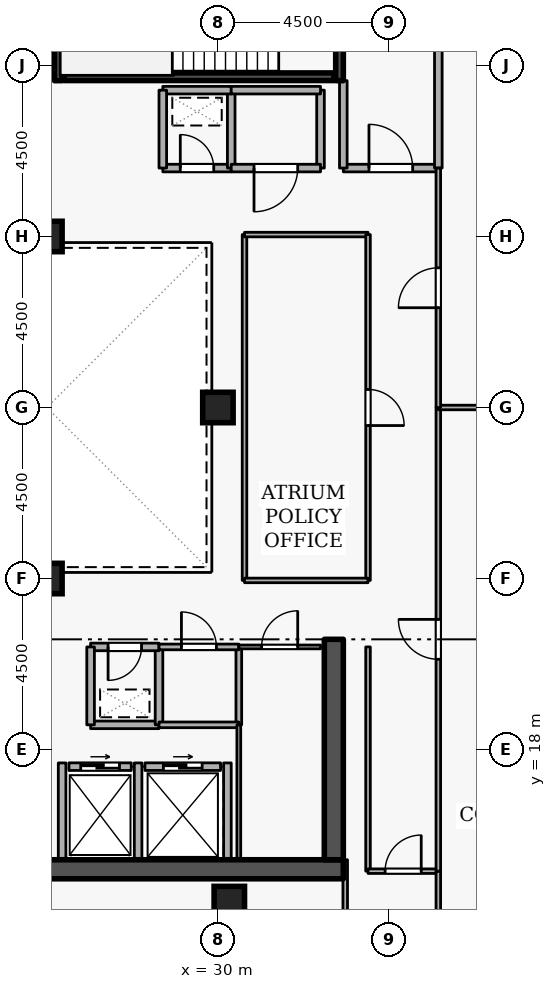
"""IFC4 building model, lengths in metres.
Left out: names, types, materials, properties, quantities, classifications, styles, units other than length and angle.
Written with IfcOpenShell. Run it as: python <this file> out.ifc"""

import sys

from ifc_helpers import new_model, si_unit, direction, frame, frame_2d, origin, origin_2d, place, context, subcontext, project, spatial, rectangle, extrude, element, fill, save


model = new_model("IFC4")
c1 = context("Model", 3, precision=1e-05, world=origin(), true_north=direction((0.0, 1.0)))
c2 = subcontext(c1, "Body", "Model", "MODEL_VIEW")
j1 = project(units=[si_unit("LENGTHUNIT", "METRE"), si_unit("PLANEANGLEUNIT", "RADIAN")], contexts=[c1])
p1 = place(None, origin())
s1 = spatial("IfcSite", under=j1, at=p1, CompositionType="ELEMENT")
p2 = place(p1, origin())
s2 = spatial("IfcBuilding", under=s1, at=p2, CompositionType="ELEMENT")
p3 = place(p2, frame((0.0, 0.0, 254.7)))
s3 = spatial("IfcBuildingStorey", under=s2, at=p3, CompositionType="ELEMENT", Elevation=254.7)
p4 = place(p3, frame((17.7, 14.85, 0.0), z_axis=(0.0, 0.0, 1.0), x_axis=(1.0, 0.0, 0.0)))
e1 = element("IfcWall", 1, at=p4, inside=s3, PredefinedType="SHEAR", context=c2, shape_type="SweptSolid", body=[
    extrude(rectangle(XDim=15.6, YDim=0.5, at=frame_2d((7.8, 0.0))), origin(), (0.0, 0.0, 1.0), 3.6),
])
p5 = place(p3, frame((33.05, 15.1, 0.0), z_axis=(0.0, 0.0, 1.0), x_axis=(0.0, 1.0, 0.0)))
e2 = element("IfcWall", 2, at=p5, inside=s3, PredefinedType="SHEAR", context=c2, shape_type="SweptSolid", body=[
    extrude(rectangle(XDim=5.8, YDim=0.5, at=frame_2d((2.9, 0.0))), origin(), (0.0, 0.0, 1.0), 3.6),
])
for number, where, z_axis, x_axis in (
    (3, (30.3, 14.0, 0.0), (0.0, 0.0, 1.0), (1.0, 0.0, 0.0)),
    (4, (25.5, 22.5, 0.0), (0.0, 0.0, 1.0), (1.0, 0.0, 0.0)),
    (5, (25.5, 31.5, 0.0), (0.0, 0.0, 1.0), (1.0, 0.0, 0.0)),
    (6, (30.0, 27.0, 0.0), (0.0, 0.0, 1.0), (1.0, 0.0, 0.0)),
):
    element("IfcColumn", number, at=place(p3, frame(where, z_axis=z_axis, x_axis=x_axis)), inside=s3, PredefinedType="COLUMN", context=c2, shape_type="SweptSolid", body=[
        extrude(rectangle(XDim=0.8, YDim=0.8, at=origin_2d()), origin(), (0.0, 0.0, 1.0), 3.6),
    ])
p6 = place(p3, frame((26.08, 17.55, 0.0), z_axis=(0.0, 0.0, 1.0), x_axis=(1.0, 0.0, 0.0)))
e7 = element("IfcWall", 7, at=p6, inside=s3, PredefinedType="STANDARD", context=c2, shape_type="SweptSolid", body=[
    extrude(rectangle(XDim=1.64, YDim=0.2, at=frame_2d((0.82, 0.0))), origin(), (0.0, 0.0, 1.0), 3.32),
])
p7 = place(p6, frame((0.31, 0.0, 0.0)))
e8 = element("IfcOpeningElement", 8, at=p7, cuts=e7, PredefinedType="OPENING", context=c2, shape_type="SweptSolid", body=[
    extrude(rectangle(XDim=1.02, YDim=2.06, at=frame_2d((0.51, 1.03))), frame((0.0, 0.11, 0.0), z_axis=(0.0, -1.0, 0.0), x_axis=(1.0, 0.0, 0.0)), (0.0, 0.0, 1.0), 0.22),
])
p8 = place(p3, frame((28.08, 17.55, 0.0), z_axis=(0.0, 0.0, 1.0), x_axis=(1.0, 0.0, 0.0)))
e9 = element("IfcWall", 9, at=p8, inside=s3, PredefinedType="STANDARD", context=c2, shape_type="SweptSolid", body=[
    extrude(rectangle(XDim=1.99, YDim=0.2, at=frame_2d((0.995, 0.0))), origin(), (0.0, 0.0, 1.0), 3.32),
])
p9 = place(p8, frame((0.485, 0.0, 0.0)))
e10 = element("IfcOpeningElement", 10, at=p9, cuts=e9, PredefinedType="OPENING", context=c2, shape_type="SweptSolid", body=[
    extrude(rectangle(XDim=1.02, YDim=2.06, at=frame_2d((0.51, 1.03))), frame((0.0, 0.11, 0.0), z_axis=(0.0, -1.0, 0.0), x_axis=(1.0, 0.0, 0.0)), (0.0, 0.0, 1.0), 0.22),
])
for number, where, z_axis, x_axis in (
    (11, (27.9, 15.112, 0.0), (0.0, 0.0, 1.0), (0.0, 1.0, 0.0)),
    (12, (25.9, 15.112, 0.0), (0.0, 0.0, 1.0), (0.0, 1.0, 0.0)),
    (13, (30.25, 15.112, 0.0), (0.0, 0.0, 1.0), (0.0, 1.0, 0.0)),
):
    element("IfcWall", number, at=place(p3, frame(where, z_axis=z_axis, x_axis=x_axis)), inside=s3, PredefinedType="STANDARD", context=c2, shape_type="SweptSolid", body=[
        extrude(rectangle(XDim=2.536, YDim=0.2, at=frame_2d((1.268, 0.0))), origin(), (0.0, 0.0, 1.0), 3.32),
    ])
p10 = place(p3, frame((33.2, 38.95, 0.0), z_axis=(0.0, 0.0, 1.0), x_axis=(0.0, -1.0, 0.0)))
e14 = element("IfcWall", 14, at=p10, inside=s3, PredefinedType="SHEAR", context=c2, shape_type="SweptSolid", body=[
    extrude(rectangle(XDim=3.35, YDim=0.2, at=frame_2d((1.675, 0.0))), origin(), (0.0, 0.0, 1.0), 3.6),
])
p11 = place(p10, frame((1.125, 0.0, 0.0)))
e15 = element("IfcOpeningElement", 15, at=p11, cuts=e14, PredefinedType="OPENING", context=c2, shape_type="SweptSolid", body=[
    extrude(rectangle(XDim=1.1, YDim=2.1, at=frame_2d((0.55, 1.05))), frame((0.0, 0.11, 0.0), z_axis=(0.0, -1.0, 0.0), x_axis=(1.0, 0.0, 0.0)), (0.0, 0.0, 1.0), 0.22),
])
p12 = place(p3, frame((25.8, 35.6, 0.0), z_axis=(0.0, 0.0, 1.0), x_axis=(0.0, 1.0, 0.0)))
e16 = element("IfcWall", 16, at=p12, inside=s3, PredefinedType="SHEAR", context=c2, shape_type="SweptSolid", body=[
    extrude(rectangle(XDim=3.35, YDim=0.2, at=frame_2d((1.675, 0.0))), origin(), (0.0, 0.0, 1.0), 3.6),
])
p13 = place(p3, frame((25.95, 35.703, 0.0), z_axis=(0.0, 0.0, 1.0), x_axis=(1.0, 0.0, 0.0)))
e17 = element("IfcWall", 17, at=p13, inside=s3, PredefinedType="SHEAR", context=c2, shape_type="SweptSolid", body=[
    extrude(rectangle(XDim=7.1, YDim=0.2, at=frame_2d((3.55, 0.0))), origin(), (0.0, 0.0, 1.0), 3.6),
])
p14 = place(p3, frame((33.3, 33.3, 0.0), z_axis=(0.0, 0.0, 1.0), x_axis=(1.0, 0.0, 0.0)))
e18 = element("IfcWall", 18, at=p14, inside=s3, PredefinedType="STANDARD", context=c2, shape_type="SweptSolid", body=[
    extrude(rectangle(XDim=2.5, YDim=0.2, at=frame_2d((1.25, 0.0))), origin(), (0.0, 0.0, 1.0), 3.32),
])
p15 = place(p14, frame((0.675, 0.0, 0.0)))
e19 = element("IfcOpeningElement", 19, at=p15, cuts=e18, PredefinedType="OPENING", context=c2, shape_type="SweptSolid", body=[
    extrude(rectangle(XDim=1.15, YDim=2.1, at=frame_2d((0.575, 1.05))), frame((0.0, 0.11, 0.0), z_axis=(0.0, -1.0, 0.0), x_axis=(1.0, 0.0, 0.0)), (0.0, 0.0, 1.0), 0.22),
])
p16 = place(p3, frame((35.8, 33.3, 0.0), z_axis=(0.0, 0.0, 1.0), x_axis=(0.0, 1.0, 0.0)))
e20 = element("IfcWall", 20, at=p16, inside=s3, PredefinedType="STANDARD", context=c2, shape_type="SweptSolid", body=[
    extrude(rectangle(XDim=5.7, YDim=0.2, at=frame_2d((2.85, 0.0))), origin(), (0.0, 0.0, 1.0), 3.32),
])
p17 = place(p3, frame((33.3, 35.6, 0.0), z_axis=(0.0, 0.0, 1.0), x_axis=(0.0, -1.0, 0.0)))
e21 = element("IfcWall", 21, at=p17, inside=s3, PredefinedType="STANDARD", context=c2, shape_type="SweptSolid", body=[
    extrude(rectangle(XDim=2.3, YDim=0.2, at=frame_2d((1.15, 0.0))), origin(), (0.0, 0.0, 1.0), 2.525),
])
p18 = place(p3, frame((26.65, 18.65, 0.0), z_axis=(0.0, 0.0, 1.0), x_axis=(1.0, 0.0, 0.0)))
e22 = element("IfcWall", 22, at=p18, inside=s3, PredefinedType="STANDARD", context=c2, shape_type="SweptSolid", body=[
    extrude(rectangle(XDim=1.8, YDim=0.2, at=frame_2d((0.9, 0.0))), origin(), (0.0, 0.0, 1.0), 3.32),
])
p19 = place(p3, frame((28.45, 18.65, 0.0), z_axis=(0.0, 0.0, 1.0), x_axis=(0.0, 1.0, 0.0)))
e23 = element("IfcWall", 23, at=p19, inside=s3, PredefinedType="STANDARD", context=c2, shape_type="SweptSolid", body=[
    extrude(rectangle(XDim=2.05, YDim=0.2, at=frame_2d((1.025, 0.0))), origin(), (0.0, 0.0, 1.0), 3.32),
])
p20 = place(p3, frame((28.45, 20.7, 0.0), z_axis=(0.0, 0.0, 1.0), x_axis=(-1.0, 0.0, 0.0)))
e24 = element("IfcWall", 24, at=p20, inside=s3, PredefinedType="STANDARD", context=c2, shape_type="SweptSolid", body=[
    extrude(rectangle(XDim=1.8, YDim=0.2, at=frame_2d((0.9, 0.0))), origin(), (0.0, 0.0, 1.0), 3.32),
])
p21 = place(p20, frame((0.46, 0.0, 0.0)))
e25 = element("IfcOpeningElement", 25, at=p21, cuts=e24, PredefinedType="OPENING", context=c2, shape_type="SweptSolid", body=[
    extrude(rectangle(XDim=0.88, YDim=2.04, at=frame_2d((0.44, 1.02))), frame((0.0, 0.11, 0.0), z_axis=(0.0, -1.0, 0.0), x_axis=(1.0, 0.0, 0.0)), (0.0, 0.0, 1.0), 0.22),
])
p22 = place(p3, frame((26.65, 20.7, 0.0), z_axis=(0.0, 0.0, 1.0), x_axis=(0.0, -1.0, 0.0)))
e26 = element("IfcWall", 26, at=p22, inside=s3, PredefinedType="STANDARD", context=c2, shape_type="SweptSolid", body=[
    extrude(rectangle(XDim=2.05, YDim=0.2, at=frame_2d((1.025, 0.0))), origin(), (0.0, 0.0, 1.0), 3.32),
])
p23 = place(p3, frame((28.55, 33.3, 0.0), z_axis=(0.0, 0.0, 1.0), x_axis=(1.0, 0.0, 0.0)))
e27 = element("IfcWall", 27, at=p23, inside=s3, PredefinedType="STANDARD", context=c2, shape_type="SweptSolid", body=[
    extrude(rectangle(XDim=1.8, YDim=0.2, at=frame_2d((0.9, 0.0))), origin(), (0.0, 0.0, 1.0), 3.32),
])
p24 = place(p23, frame((0.46, 0.0, 0.0)))
e28 = element("IfcOpeningElement", 28, at=p24, cuts=e27, PredefinedType="OPENING", context=c2, shape_type="SweptSolid", body=[
    extrude(rectangle(XDim=0.88, YDim=2.04, at=frame_2d((0.44, 1.02))), frame((0.0, 0.11, 0.0), z_axis=(0.0, -1.0, 0.0), x_axis=(1.0, 0.0, 0.0)), (0.0, 0.0, 1.0), 0.22),
])
p25 = place(p3, frame((30.35, 33.3, 0.0), z_axis=(0.0, 0.0, 1.0), x_axis=(0.0, 1.0, 0.0)))
e29 = element("IfcWall", 29, at=p25, inside=s3, PredefinedType="STANDARD", context=c2, shape_type="SweptSolid", body=[
    extrude(rectangle(XDim=2.05, YDim=0.2, at=frame_2d((1.025, 0.0))), origin(), (0.0, 0.0, 1.0), 3.32),
])
p26 = place(p3, frame((30.35, 35.35, 0.0), z_axis=(0.0, 0.0, 1.0), x_axis=(-1.0, 0.0, 0.0)))
e30 = element("IfcWall", 30, at=p26, inside=s3, PredefinedType="STANDARD", context=c2, shape_type="SweptSolid", body=[
    extrude(rectangle(XDim=1.8, YDim=0.2, at=frame_2d((0.9, 0.0))), origin(), (0.0, 0.0, 1.0), 3.32),
])
p27 = place(p3, frame((28.55, 35.35, 0.0), z_axis=(0.0, 0.0, 1.0), x_axis=(0.0, -1.0, 0.0)))
e31 = element("IfcWall", 31, at=p27, inside=s3, PredefinedType="STANDARD", context=c2, shape_type="SweptSolid", body=[
    extrude(rectangle(XDim=2.05, YDim=0.2, at=frame_2d((1.025, 0.0))), origin(), (0.0, 0.0, 1.0), 3.32),
])
p28 = place(p3, frame((32.7, 35.35, 0.0), z_axis=(0.0, 0.0, 1.0), x_axis=(0.0, -1.0, 0.0)))
e32 = element("IfcWall", 32, at=p28, inside=s3, PredefinedType="STANDARD", context=c2, shape_type="SweptSolid", body=[
    extrude(rectangle(XDim=2.05, YDim=0.2, at=frame_2d((1.025, 0.0))), origin(), (0.0, 0.0, 1.0), 2.525),
])
p29 = place(p3, frame((32.7, 33.3, 0.0), z_axis=(0.0, 0.0, 1.0), x_axis=(-1.0, 0.0, 0.0)))
e33 = element("IfcWall", 33, at=p29, inside=s3, PredefinedType="STANDARD", context=c2, shape_type="SweptSolid", body=[
    extrude(rectangle(XDim=2.35, YDim=0.2, at=frame_2d((1.175, 0.0))), origin(), (0.0, 0.0, 1.0), 3.32),
])
p30 = place(p29, frame((0.6, 0.0, 0.0)))
e34 = element("IfcOpeningElement", 34, at=p30, cuts=e33, PredefinedType="OPENING", context=c2, shape_type="SweptSolid", body=[
    extrude(rectangle(XDim=1.15, YDim=2.1, at=frame_2d((0.575, 1.05))), frame((0.0, 0.11, 0.0), z_axis=(0.0, -1.0, 0.0), x_axis=(1.0, 0.0, 0.0)), (0.0, 0.0, 1.0), 0.22),
])
p31 = place(p3, frame((30.35, 35.35, 0.0), z_axis=(0.0, 0.0, 1.0), x_axis=(1.0, 0.0, 0.0)))
e35 = element("IfcWall", 35, at=p31, inside=s3, PredefinedType="STANDARD", context=c2, shape_type="SweptSolid", body=[
    extrude(rectangle(XDim=2.35, YDim=0.2, at=frame_2d((1.175, 0.0))), origin(), (0.0, 0.0, 1.0), 3.32),
])
p32 = place(p3, frame((30.55, 20.7, 0.0), z_axis=(0.0, 0.0, 1.0), x_axis=(0.0, -1.0, 0.0)))
e36 = element("IfcWall", 36, at=p32, inside=s3, PredefinedType="PARTITIONING", context=c2, shape_type="SweptSolid", body=[
    extrude(rectangle(XDim=2.05, YDim=0.15, at=frame_2d((1.025, 0.0))), origin(), (0.0, 0.0, 1.0), 3.32),
])
p33 = place(p3, frame((30.55, 18.65, 0.0), z_axis=(0.0, 0.0, 1.0), x_axis=(-1.0, 0.0, 0.0)))
e37 = element("IfcWall", 37, at=p33, inside=s3, PredefinedType="PARTITIONING", context=c2, shape_type="SweptSolid", body=[
    extrude(rectangle(XDim=2.1, YDim=0.15, at=frame_2d((1.05, 0.0))), origin(), (0.0, 0.0, 1.0), 3.32),
])
p34 = place(p3, frame((28.45, 20.7, 0.0), z_axis=(0.0, 0.0, 1.0), x_axis=(1.0, 0.0, 0.0)))
e38 = element("IfcWall", 38, at=p34, inside=s3, PredefinedType="PARTITIONING", context=c2, shape_type="SweptSolid", body=[
    extrude(rectangle(XDim=2.1, YDim=0.15, at=frame_2d((1.05, 0.0))), origin(), (0.0, 0.0, 1.0), 3.32),
])
p35 = place(p34, frame((0.59, 0.0, 0.0)))
e39 = element("IfcOpeningElement", 39, at=p35, cuts=e38, PredefinedType="OPENING", context=c2, shape_type="SweptSolid", body=[
    extrude(rectangle(XDim=0.92, YDim=2.08, at=frame_2d((0.46, 1.04))), frame((0.0, 0.085, 0.0), z_axis=(0.0, -1.0, 0.0), x_axis=(1.0, 0.0, 0.0)), (0.0, 0.0, 1.0), 0.17),
])
p36 = place(p3, frame((30.55, 15.1, 0.0), z_axis=(0.0, 0.0, 1.0), x_axis=(0.0, 1.0, 0.0)))
e40 = element("IfcWall", 40, at=p36, inside=s3, PredefinedType="PARTITIONING", context=c2, shape_type="SweptSolid", body=[
    extrude(rectangle(XDim=3.55, YDim=0.1, at=frame_2d((1.775, 0.0))), origin(), (0.0, 0.0, 1.0), 3.32),
])
p37 = place(p3, frame((30.55, 20.7, 0.0), z_axis=(0.0, 0.0, 1.0), x_axis=(1.0, 0.0, 0.0)))
e41 = element("IfcWall", 41, at=p37, inside=s3, PredefinedType="PARTITIONING", context=c2, shape_type="SweptSolid", body=[
    extrude(rectangle(XDim=2.15, YDim=0.1, at=frame_2d((1.075, 0.0))), origin(), (0.0, 0.0, 1.0), 3.32),
])
p38 = place(p37, frame((0.6, 0.0, 0.0)))
e42 = element("IfcOpeningElement", 42, at=p38, cuts=e41, PredefinedType="OPENING", context=c2, shape_type="SweptSolid", body=[
    extrude(rectangle(XDim=0.95, YDim=2.1, at=frame_2d((0.475, 1.05))), frame((0.0, 0.06, 0.0), z_axis=(0.0, -1.0, 0.0), x_axis=(1.0, 0.0, 0.0)), (0.0, 0.0, 1.0), 0.12),
])
p39 = place(p3, frame((33.95, 20.7, 0.0), z_axis=(0.0, 0.0, 1.0), x_axis=(0.0, -1.0, 0.0)))
e43 = element("IfcWall", 43, at=p39, inside=s3, PredefinedType="PARTITIONING", context=c2, shape_type="SweptSolid", body=[
    extrude(rectangle(XDim=5.9, YDim=0.12, at=frame_2d((2.95, 0.0))), origin(), (0.0, 0.0, 1.0), 3.32),
])
p40 = place(p3, frame((33.95, 14.8, 0.0), z_axis=(0.0, 0.0, 1.0), x_axis=(1.0, 0.0, 0.0)))
e44 = element("IfcWall", 44, at=p40, inside=s3, PredefinedType="PARTITIONING", context=c2, shape_type="SweptSolid", body=[
    extrude(rectangle(XDim=1.85, YDim=0.12, at=frame_2d((0.925, 0.0))), origin(), (0.0, 0.0, 1.0), 3.32),
])
p41 = place(p40, frame((0.45, 0.0, 0.0)))
e45 = element("IfcOpeningElement", 45, at=p41, cuts=e44, PredefinedType="OPENING", context=c2, shape_type="SweptSolid", body=[
    extrude(rectangle(XDim=0.95, YDim=2.1, at=frame_2d((0.475, 1.05))), frame((0.0, 0.07, 0.0), z_axis=(0.0, -1.0, 0.0), x_axis=(1.0, 0.0, 0.0)), (0.0, 0.0, 1.0), 0.14),
])
p42 = place(p3, frame((35.8, 14.8, 0.0), z_axis=(0.0, 0.0, 1.0), x_axis=(0.0, -1.0, 0.0)))
e46 = element("IfcWall", 46, at=p42, inside=s3, PredefinedType="PARTITIONING", context=c2, shape_type="SweptSolid", body=[
    extrude(rectangle(XDim=11.52, YDim=0.12, at=frame_2d((5.76, 0.0))), origin(), (0.0, 0.0, 1.0), 3.32),
])
p43 = place(p3, frame((33.35, 3.28, 0.0), z_axis=(0.0, 0.0, 1.0), x_axis=(0.0, 1.0, 0.0)))
e47 = element("IfcWall", 47, at=p43, inside=s3, PredefinedType="PARTITIONING", context=c2, shape_type="SweptSolid", body=[
    extrude(rectangle(XDim=11.82, YDim=0.12, at=frame_2d((5.91, 0.0))), origin(), (0.0, 0.0, 1.0), 2.525),
])
p44 = place(p3, frame((35.8, 14.8, 0.0), z_axis=(0.0, 0.0, 1.0), x_axis=(0.0, 1.0, 0.0)))
e48 = element("IfcWall", 48, at=p44, inside=s3, PredefinedType="PARTITIONING", context=c2, shape_type="SweptSolid", body=[
    extrude(rectangle(XDim=12.2, YDim=0.12, at=frame_2d((6.1, 0.0))), origin(), (0.0, 0.0, 1.0), 3.32),
])
p45 = place(p44, frame((5.575, 0.0, 0.0)))
e49 = element("IfcOpeningElement", 49, at=p45, cuts=e48, PredefinedType="OPENING", context=c2, shape_type="SweptSolid", body=[
    extrude(rectangle(XDim=1.05, YDim=2.1, at=frame_2d((0.525, 1.05))), frame((0.0, 0.07, 0.0), z_axis=(0.0, -1.0, 0.0), x_axis=(1.0, 0.0, 0.0)), (0.0, 0.0, 1.0), 0.14),
])
p46 = place(p3, frame((35.8, 27.0, 0.0), z_axis=(0.0, 0.0, 1.0), x_axis=(1.0, 0.0, 0.0)))
e50 = element("IfcWall", 50, at=p46, inside=s3, PredefinedType="PARTITIONING", context=c2, shape_type="SweptSolid", body=[
    extrude(rectangle(XDim=13.42, YDim=0.12, at=frame_2d((6.71, 0.0))), origin(), (0.0, 0.0, 1.0), 2.912),
])
p47 = place(p3, frame((35.8, 27.0, 0.0), z_axis=(0.0, 0.0, 1.0), x_axis=(0.0, 1.0, 0.0)))
e51 = element("IfcWall", 51, at=p47, inside=s3, PredefinedType="PARTITIONING", context=c2, shape_type="SweptSolid", body=[
    extrude(rectangle(XDim=6.3, YDim=0.12, at=frame_2d((3.15, 0.0))), origin(), (0.0, 0.0, 1.0), 3.32),
])
p48 = place(p47, frame((2.625, 0.0, 0.0)))
e52 = element("IfcOpeningElement", 52, at=p48, cuts=e51, PredefinedType="OPENING", context=c2, shape_type="SweptSolid", body=[
    extrude(rectangle(XDim=1.05, YDim=2.1, at=frame_2d((0.525, 1.05))), frame((0.0, 0.07, 0.0), z_axis=(0.0, -1.0, 0.0), x_axis=(1.0, 0.0, 0.0)), (0.0, 0.0, 1.0), 0.14),
])
p49 = place(p3, frame((30.7, 22.45, 0.0), z_axis=(0.0, 0.0, 1.0), x_axis=(0.0, 1.0, 0.0)))
e53 = element("IfcWall", 53, at=p49, inside=s3, PredefinedType="PARTITIONING", context=c2, shape_type="SweptSolid", body=[
    extrude(rectangle(XDim=9.1, YDim=0.12, at=frame_2d((4.55, 0.0))), origin(), (0.0, 0.0, 1.0), 3.32),
])
p50 = place(p3, frame((30.7, 31.55, 0.0), z_axis=(0.0, 0.0, 1.0), x_axis=(1.0, 0.0, 0.0)))
e54 = element("IfcWall", 54, at=p50, inside=s3, PredefinedType="PARTITIONING", context=c2, shape_type="SweptSolid", body=[
    extrude(rectangle(XDim=3.25, YDim=0.12, at=frame_2d((1.625, 0.0))), origin(), (0.0, 0.0, 1.0), 3.32),
])
p51 = place(p3, frame((33.95, 31.55, 0.0), z_axis=(0.0, 0.0, 1.0), x_axis=(0.0, -1.0, 0.0)))
e55 = element("IfcWall", 55, at=p51, inside=s3, PredefinedType="PARTITIONING", context=c2, shape_type="SweptSolid", body=[
    extrude(rectangle(XDim=9.1, YDim=0.12, at=frame_2d((4.55, 0.0))), origin(), (0.0, 0.0, 1.0), 3.32),
])
p52 = place(p51, frame((4.075, 0.0, 0.0)))
e56 = element("IfcOpeningElement", 56, at=p52, cuts=e55, PredefinedType="OPENING", context=c2, shape_type="SweptSolid", body=[
    extrude(rectangle(XDim=0.95, YDim=2.1, at=frame_2d((0.475, 1.05))), frame((0.0, 0.07, 0.0), z_axis=(0.0, -1.0, 0.0), x_axis=(1.0, 0.0, 0.0)), (0.0, 0.0, 1.0), 0.14),
])
p53 = place(p3, frame((33.95, 22.45, 0.0), z_axis=(0.0, 0.0, 1.0), x_axis=(-1.0, 0.0, 0.0)))
e57 = element("IfcWall", 57, at=p53, inside=s3, PredefinedType="PARTITIONING", context=c2, shape_type="SweptSolid", body=[
    extrude(rectangle(XDim=3.25, YDim=0.12, at=frame_2d((1.625, 0.0))), origin(), (0.0, 0.0, 1.0), 3.32),
])
p54 = place(p7, origin())
e58 = element("IfcDoor", 58, at=p54, inside=s3, OperationType="SLIDING_TO_LEFT", PredefinedType="DOOR", context=c2, shape_type="SweptSolid", body=[
    extrude(rectangle(XDim=1.02, YDim=2.06, at=frame_2d((0.51, 1.03))), frame((0.0, 0.025, 0.0), z_axis=(0.0, -1.0, 0.0), x_axis=(1.0, 0.0, 0.0)), (0.0, 0.0, 1.0), 0.05),
])
fill(e8, e58)
p55 = place(p9, origin())
e59 = element("IfcDoor", 59, at=p55, inside=s3, OperationType="SLIDING_TO_LEFT", PredefinedType="DOOR", context=c2, shape_type="SweptSolid", body=[
    extrude(rectangle(XDim=1.02, YDim=2.06, at=frame_2d((0.51, 1.03))), frame((0.0, 0.025, 0.0), z_axis=(0.0, -1.0, 0.0), x_axis=(1.0, 0.0, 0.0)), (0.0, 0.0, 1.0), 0.05),
])
fill(e10, e59)
p56 = place(p15, origin())
e60 = element("IfcDoor", 60, at=p56, inside=s3, OperationType="SINGLE_SWING_LEFT", PredefinedType="DOOR", context=c2, shape_type="SweptSolid", body=[
    extrude(rectangle(XDim=1.15, YDim=2.1, at=frame_2d((0.575, 1.05))), frame((0.0, 0.025, 0.0), z_axis=(0.0, -1.0, 0.0), x_axis=(1.0, 0.0, 0.0)), (0.0, 0.0, 1.0), 0.05),
])
fill(e19, e60)
p57 = place(p21, origin())
e61 = element("IfcDoor", 61, at=p57, inside=s3, OperationType="SINGLE_SWING_RIGHT", PredefinedType="DOOR", context=c2, shape_type="SweptSolid", body=[
    extrude(rectangle(XDim=0.88, YDim=2.04, at=frame_2d((0.44, 1.02))), frame((0.0, 0.025, 0.0), z_axis=(0.0, -1.0, 0.0), x_axis=(1.0, 0.0, 0.0)), (0.0, 0.0, 1.0), 0.05),
])
fill(e25, e61)
p58 = place(p24, origin())
e62 = element("IfcDoor", 62, at=p58, inside=s3, OperationType="SINGLE_SWING_LEFT", PredefinedType="DOOR", context=c2, shape_type="SweptSolid", body=[
    extrude(rectangle(XDim=0.88, YDim=2.04, at=frame_2d((0.44, 1.02))), frame((0.0, 0.025, 0.0), z_axis=(0.0, -1.0, 0.0), x_axis=(1.0, 0.0, 0.0)), (0.0, 0.0, 1.0), 0.05),
])
fill(e28, e62)
p59 = place(p35, origin())
e63 = element("IfcDoor", 63, at=p59, inside=s3, OperationType="SINGLE_SWING_LEFT", PredefinedType="DOOR", context=c2, shape_type="SweptSolid", body=[
    extrude(rectangle(XDim=0.92, YDim=2.08, at=frame_2d((0.46, 1.04))), frame((0.0, 0.025, 0.0), z_axis=(0.0, -1.0, 0.0), x_axis=(1.0, 0.0, 0.0)), (0.0, 0.0, 1.0), 0.05),
])
fill(e39, e63)
p60 = place(p38, origin())
e64 = element("IfcDoor", 64, at=p60, inside=s3, OperationType="SINGLE_SWING_RIGHT", PredefinedType="DOOR", context=c2, shape_type="SweptSolid", body=[
    extrude(rectangle(XDim=0.95, YDim=2.1, at=frame_2d((0.475, 1.05))), frame((0.0, 0.025, 0.0), z_axis=(0.0, -1.0, 0.0), x_axis=(1.0, 0.0, 0.0)), (0.0, 0.0, 1.0), 0.05),
])
fill(e42, e64)
p61 = place(p30, origin())
e65 = element("IfcDoor", 65, at=p61, inside=s3, OperationType="SINGLE_SWING_RIGHT", PredefinedType="DOOR", context=c2, shape_type="SweptSolid", body=[
    extrude(rectangle(XDim=1.15, YDim=2.1, at=frame_2d((0.575, 1.05))), frame((0.0, 0.025, 0.0), z_axis=(0.0, -1.0, 0.0), x_axis=(1.0, 0.0, 0.0)), (0.0, 0.0, 1.0), 0.05),
])
fill(e34, e65)
p62 = place(p41, origin())
e66 = element("IfcDoor", 66, at=p62, inside=s3, OperationType="SINGLE_SWING_RIGHT", PredefinedType="DOOR", context=c2, shape_type="SweptSolid", body=[
    extrude(rectangle(XDim=0.95, YDim=2.1, at=frame_2d((0.475, 1.05))), frame((0.0, 0.025, 0.0), z_axis=(0.0, -1.0, 0.0), x_axis=(1.0, 0.0, 0.0)), (0.0, 0.0, 1.0), 0.05),
])
fill(e45, e66)
p63 = place(p45, origin())
e67 = element("IfcDoor", 67, at=p63, inside=s3, OperationType="SINGLE_SWING_RIGHT", PredefinedType="DOOR", context=c2, shape_type="SweptSolid", body=[
    extrude(rectangle(XDim=1.05, YDim=2.1, at=frame_2d((0.525, 1.05))), frame((0.0, 0.025, 0.0), z_axis=(0.0, -1.0, 0.0), x_axis=(1.0, 0.0, 0.0)), (0.0, 0.0, 1.0), 0.05),
])
fill(e49, e67)
p64 = place(p48, origin())
e68 = element("IfcDoor", 68, at=p64, inside=s3, OperationType="SINGLE_SWING_LEFT", PredefinedType="DOOR", context=c2, shape_type="SweptSolid", body=[
    extrude(rectangle(XDim=1.05, YDim=2.1, at=frame_2d((0.525, 1.05))), frame((0.0, 0.025, 0.0), z_axis=(0.0, -1.0, 0.0), x_axis=(1.0, 0.0, 0.0)), (0.0, 0.0, 1.0), 0.05),
])
fill(e52, e68)
p65 = place(p52, origin())
e69 = element("IfcDoor", 69, at=p65, inside=s3, OperationType="SINGLE_SWING_RIGHT", PredefinedType="DOOR", context=c2, shape_type="SweptSolid", body=[
    extrude(rectangle(XDim=0.95, YDim=2.1, at=frame_2d((0.475, 1.05))), frame((0.0, 0.025, 0.0), z_axis=(0.0, -1.0, 0.0), x_axis=(1.0, 0.0, 0.0)), (0.0, 0.0, 1.0), 0.05),
])
fill(e56, e69)
save(model, sys.argv[1])
